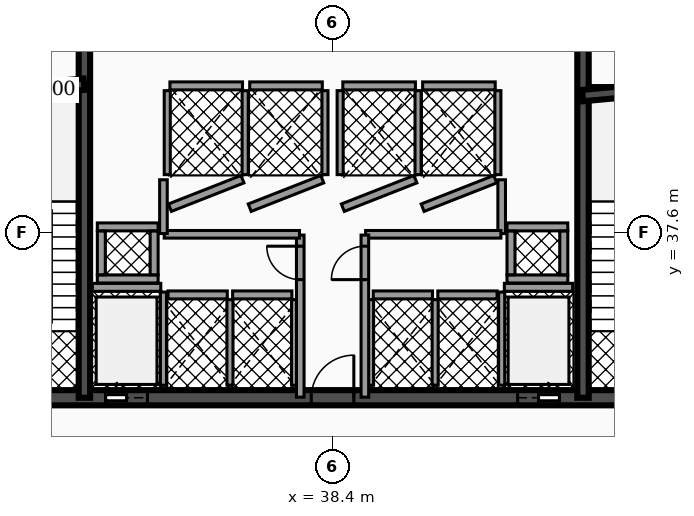
"""IFC4 building model, lengths in metres.
Left out: names, types, materials, properties, quantities, classifications, styles, units other than length and angle.
Written with IfcOpenShell. Run it as: python <this file> out.ifc"""

import sys

from ifc_helpers import new_model, si_unit, direction, frame, frame_2d, origin, place, context, subcontext, project, spatial, rectangle, extrude, element, fill, save


model = new_model("IFC4")
c1 = context("Model", 3, precision=1e-05, world=origin(), true_north=direction((0.0, 1.0)))
c2 = subcontext(c1, "Body", "Model", "MODEL_VIEW")
j1 = project(units=[si_unit("LENGTHUNIT", "METRE"), si_unit("PLANEANGLEUNIT", "RADIAN")], contexts=[c1])
p1 = place(None, origin())
s1 = spatial("IfcSite", under=j1, at=p1, CompositionType="ELEMENT")
p2 = place(p1, origin())
s2 = spatial("IfcBuilding", under=s1, at=p2, CompositionType="ELEMENT")
p3 = place(p2, frame((0.0, 0.0, 9.52)))
s3 = spatial("IfcBuildingStorey", under=s2, at=p3, CompositionType="ELEMENT", Elevation=9.52)
p4 = place(p3, frame((28.4, 33.25, 0.0), z_axis=(0.0, 0.0, 1.0), x_axis=(1.0, 0.0, 0.0)))
e1 = element("IfcWall", 1, at=p4, inside=s3, PredefinedType="SHEAR", context=c2, shape_type="SweptSolid", body=[
    extrude(rectangle(XDim=20.06, YDim=0.4, at=frame_2d((10.03, 0.0))), origin(), (0.0, 0.0, 1.0), 4.14),
])
p5 = place(p4, frame((4.03, 0.0, 0.0)))
e2 = element("IfcOpeningElement", 2, at=p5, cuts=e1, PredefinedType="OPENING", context=c2, shape_type="SweptSolid", body=[
    extrude(rectangle(XDim=1.1, YDim=2.15, at=frame_2d((0.55, 1.075))), frame((0.0, 0.21, 0.0), z_axis=(0.0, -1.0, 0.0), x_axis=(1.0, 0.0, 0.0)), (0.0, 0.0, 1.0), 0.42),
])
p6 = place(p4, frame((14.87, 0.0, 0.0)))
e3 = element("IfcOpeningElement", 3, at=p6, cuts=e1, PredefinedType="OPENING", context=c2, shape_type="SweptSolid", body=[
    extrude(rectangle(XDim=1.1, YDim=2.15, at=frame_2d((0.55, 1.075))), frame((0.0, 0.21, 0.0), z_axis=(0.0, -1.0, 0.0), x_axis=(1.0, 0.0, 0.0)), (0.0, 0.0, 1.0), 0.42),
])
p7 = place(p4, frame((1.31, 0.0, 0.0)))
e4 = element("IfcOpeningElement", 4, at=p7, cuts=e1, PredefinedType="OPENING", context=c2, shape_type="SweptSolid", body=[
    extrude(rectangle(XDim=1.1, YDim=2.2, at=frame_2d((0.55, 1.1))), frame((0.0, 0.21, 0.0), z_axis=(0.0, -1.0, 0.0), x_axis=(1.0, 0.0, 0.0)), (0.0, 0.0, 1.0), 0.42),
])
p8 = place(p4, frame((9.44, 0.0, 0.0)))
e5 = element("IfcOpeningElement", 5, at=p8, cuts=e1, PredefinedType="OPENING", context=c2, shape_type="SweptSolid", body=[
    extrude(rectangle(XDim=1.12, YDim=2.05, at=frame_2d((0.56, 1.025))), frame((0.0, 0.21, 0.0), z_axis=(0.0, -1.0, 0.0), x_axis=(1.0, 0.0, 0.0)), (0.0, 0.0, 1.0), 0.42),
])
p9 = place(p4, frame((17.65, 0.0, 0.0)))
e6 = element("IfcOpeningElement", 6, at=p9, cuts=e1, PredefinedType="OPENING", context=c2, shape_type="SweptSolid", body=[
    extrude(rectangle(XDim=1.1, YDim=2.2, at=frame_2d((0.55, 1.1))), frame((0.0, 0.21, 0.0), z_axis=(0.0, -1.0, 0.0), x_axis=(1.0, 0.0, 0.0)), (0.0, 0.0, 1.0), 0.42),
])
for number, where, z_axis, x_axis in (
    (7, (31.87, 33.25, 0.0), (0.0, 0.0, 1.0), (0.0, 1.0, 0.0)),
    (8, (44.99, 33.25, 0.0), (0.0, 0.0, 1.0), (0.0, 1.0, 0.0)),
):
    element("IfcWall", number, at=place(p3, frame(where, z_axis=z_axis, x_axis=x_axis)), inside=s3, PredefinedType="SHEAR", context=c2, shape_type="SweptSolid", body=[
        extrude(rectangle(XDim=10.2, YDim=0.3, at=frame_2d((5.1, 0.0))), origin(), (0.0, 0.0, 1.0), 4.14),
    ])
p10 = place(p3, frame((28.64, 41.2, 0.0), z_axis=(0.0, 0.0, 1.0), x_axis=(0.995687118776, 0.092774789157, 0.0)))
e9 = element("IfcWall", 9, at=p10, inside=s3, PredefinedType="SHEAR", context=c2, shape_type="SweptSolid", body=[
    extrude(rectangle(XDim=3.234, YDim=0.3, at=frame_2d((1.617, 0.0))), origin(), (0.0, 0.0, 1.0), 4.14),
])
p11 = place(p3, frame((44.98, 41.2, 0.0), z_axis=(0.0, 0.0, 1.0), x_axis=(0.995686468965, 0.09278176286, 0.0)))
e10 = element("IfcWall", 10, at=p11, inside=s3, PredefinedType="SHEAR", context=c2, shape_type="SweptSolid", body=[
    extrude(rectangle(XDim=3.234, YDim=0.3, at=frame_2d((1.617, 0.0))), origin(), (0.0, 0.0, 1.0), 4.14),
])
p12 = place(p3, frame((32.08, 36.155, 0.0), z_axis=(0.0, 0.0, 1.0), x_axis=(1.0, 0.0, 0.0)))
e11 = element("IfcWall", 11, at=p12, inside=s3, PredefinedType="SOLIDWALL", context=c2, shape_type="SweptSolid", body=[
    extrude(rectangle(XDim=1.8, YDim=0.21, at=frame_2d((0.9, 0.0))), origin(), (0.0, 0.0, 1.0), 3.112),
])
p13 = place(p3, frame((33.95, 33.58, 0.0), z_axis=(0.0, 0.0, 1.0), x_axis=(0.0, 1.0, 0.0)))
e12 = element("IfcWall", 12, at=p13, inside=s3, PredefinedType="SOLIDWALL", context=c2, shape_type="SweptSolid", body=[
    extrude(rectangle(XDim=2.45, YDim=0.16, at=frame_2d((1.225, 0.0))), origin(), (0.0, 0.0, 1.0), 3.112),
])
p14 = place(p3, frame((42.92, 36.155, 0.0), z_axis=(0.0, 0.0, 1.0), x_axis=(1.0, 0.0, 0.0)))
e13 = element("IfcWall", 13, at=p14, inside=s3, PredefinedType="SOLIDWALL", context=c2, shape_type="SweptSolid", body=[
    extrude(rectangle(XDim=1.8, YDim=0.21, at=frame_2d((0.9, 0.0))), origin(), (0.0, 0.0, 1.0), 3.112),
])
p15 = place(p3, frame((42.85, 33.58, 0.0), z_axis=(0.0, 0.0, 1.0), x_axis=(0.0, 1.0, 0.0)))
e14 = element("IfcWall", 14, at=p15, inside=s3, PredefinedType="SOLIDWALL", context=c2, shape_type="SweptSolid", body=[
    extrude(rectangle(XDim=2.45, YDim=0.16, at=frame_2d((1.225, 0.0))), origin(), (0.0, 0.0, 1.0), 3.112),
])
p16 = place(p3, frame((34.12, 38.25, 0.0), z_axis=(0.0, 0.0, 1.0), x_axis=(0.930804993012, 0.36551616241, 0.0)))
e15 = element("IfcWall", 15, at=p16, inside=s3, PredefinedType="SOLIDWALL", context=c2, shape_type="SweptSolid", body=[
    extrude(rectangle(XDim=2.052, YDim=0.21, at=frame_2d((1.026, 0.0))), origin(), (0.0, 0.0, 1.0), 3.112),
])
p17 = place(p3, frame((34.12, 41.455, 0.0), z_axis=(0.0, 0.0, 1.0), x_axis=(1.0, 0.0, 0.0)))
e16 = element("IfcWall", 16, at=p17, inside=s3, PredefinedType="SOLIDWALL", context=c2, shape_type="SweptSolid", body=[
    extrude(rectangle(XDim=1.91, YDim=0.21, at=frame_2d((0.955, 0.0))), origin(), (0.0, 0.0, 1.0), 3.112),
])
for number, where, z_axis, x_axis in (
    (17, (34.05, 39.12, 0.0), (0.0, 0.0, 1.0), (0.0, 1.0, 0.0)),
    (18, (36.1, 39.12, 0.0), (0.0, 0.0, 1.0), (0.0, 1.0, 0.0)),
):
    element("IfcWall", number, at=place(p3, frame(where, z_axis=z_axis, x_axis=x_axis)), inside=s3, PredefinedType="SOLIDWALL", context=c2, shape_type="SweptSolid", body=[
        extrude(rectangle(XDim=2.21, YDim=0.16, at=frame_2d((1.105, 0.0))), origin(), (0.0, 0.0, 1.0), 3.112),
    ])
p18 = place(p3, frame((36.22, 38.25, 0.0), z_axis=(0.0, 0.0, 1.0), x_axis=(0.930804993012, 0.36551616241, 0.0)))
e19 = element("IfcWall", 19, at=p18, inside=s3, PredefinedType="SOLIDWALL", context=c2, shape_type="SweptSolid", body=[
    extrude(rectangle(XDim=2.052, YDim=0.21, at=frame_2d((1.026, 0.0))), origin(), (0.0, 0.0, 1.0), 3.112),
])
p19 = place(p3, frame((36.22, 41.455, 0.0), z_axis=(0.0, 0.0, 1.0), x_axis=(1.0, 0.0, 0.0)))
e20 = element("IfcWall", 20, at=p19, inside=s3, PredefinedType="SOLIDWALL", context=c2, shape_type="SweptSolid", body=[
    extrude(rectangle(XDim=1.91, YDim=0.21, at=frame_2d((0.955, 0.0))), origin(), (0.0, 0.0, 1.0), 3.112),
])
p20 = place(p3, frame((38.2, 39.12, 0.0), z_axis=(0.0, 0.0, 1.0), x_axis=(0.0, 1.0, 0.0)))
e21 = element("IfcWall", 21, at=p20, inside=s3, PredefinedType="SOLIDWALL", context=c2, shape_type="SweptSolid", body=[
    extrude(rectangle(XDim=2.21, YDim=0.16, at=frame_2d((1.105, 0.0))), origin(), (0.0, 0.0, 1.0), 3.112),
])
p21 = place(p3, frame((38.67, 38.25, 0.0), z_axis=(0.0, 0.0, 1.0), x_axis=(0.930820886763, 0.3654756856, 0.0)))
e22 = element("IfcWall", 22, at=p21, inside=s3, PredefinedType="SOLIDWALL", context=c2, shape_type="SweptSolid", body=[
    extrude(rectangle(XDim=2.052, YDim=0.21, at=frame_2d((1.026, 0.0))), origin(), (0.0, 0.0, 1.0), 3.112),
])
p22 = place(p3, frame((38.67, 41.455, 0.0), z_axis=(0.0, 0.0, 1.0), x_axis=(1.0, 0.0, 0.0)))
e23 = element("IfcWall", 23, at=p22, inside=s3, PredefinedType="SOLIDWALL", context=c2, shape_type="SweptSolid", body=[
    extrude(rectangle(XDim=1.91, YDim=0.21, at=frame_2d((0.955, 0.0))), origin(), (0.0, 0.0, 1.0), 3.112),
])
for number, where, z_axis, x_axis in (
    (24, (38.6, 39.12, 0.0), (0.0, 0.0, 1.0), (0.0, 1.0, 0.0)),
    (25, (40.65, 39.12, 0.0), (0.0, 0.0, 1.0), (0.0, 1.0, 0.0)),
):
    element("IfcWall", number, at=place(p3, frame(where, z_axis=z_axis, x_axis=x_axis)), inside=s3, PredefinedType="SOLIDWALL", context=c2, shape_type="SweptSolid", body=[
        extrude(rectangle(XDim=2.21, YDim=0.16, at=frame_2d((1.105, 0.0))), origin(), (0.0, 0.0, 1.0), 3.112),
    ])
p23 = place(p3, frame((40.77, 38.25, 0.0), z_axis=(0.0, 0.0, 1.0), x_axis=(0.930804993012, 0.36551616241, 0.0)))
e26 = element("IfcWall", 26, at=p23, inside=s3, PredefinedType="SOLIDWALL", context=c2, shape_type="SweptSolid", body=[
    extrude(rectangle(XDim=2.052, YDim=0.21, at=frame_2d((1.026, 0.0))), origin(), (0.0, 0.0, 1.0), 3.112),
])
p24 = place(p3, frame((40.77, 41.455, 0.0), z_axis=(0.0, 0.0, 1.0), x_axis=(1.0, 0.0, 0.0)))
e27 = element("IfcWall", 27, at=p24, inside=s3, PredefinedType="SOLIDWALL", context=c2, shape_type="SweptSolid", body=[
    extrude(rectangle(XDim=1.91, YDim=0.21, at=frame_2d((0.955, 0.0))), origin(), (0.0, 0.0, 1.0), 3.112),
])
p25 = place(p3, frame((42.75, 39.12, 0.0), z_axis=(0.0, 0.0, 1.0), x_axis=(0.0, 1.0, 0.0)))
e28 = element("IfcWall", 28, at=p25, inside=s3, PredefinedType="SOLIDWALL", context=c2, shape_type="SweptSolid", body=[
    extrude(rectangle(XDim=2.21, YDim=0.16, at=frame_2d((1.105, 0.0))), origin(), (0.0, 0.0, 1.0), 3.112),
])
p26 = place(p3, frame((34.07, 35.955, 0.0), z_axis=(0.0, 0.0, 1.0), x_axis=(1.0, 0.0, 0.0)))
e29 = element("IfcWall", 29, at=p26, inside=s3, PredefinedType="SOLIDWALL", context=c2, shape_type="SweptSolid", body=[
    extrude(rectangle(XDim=1.56, YDim=0.21, at=frame_2d((0.78, 0.0))), origin(), (0.0, 0.0, 1.0), 3.112),
])
p27 = place(p3, frame((35.7, 33.58, 0.0), z_axis=(0.0, 0.0, 1.0), x_axis=(0.0, 1.0, 0.0)))
e30 = element("IfcWall", 30, at=p27, inside=s3, PredefinedType="SOLIDWALL", context=c2, shape_type="SweptSolid", body=[
    extrude(rectangle(XDim=2.25, YDim=0.16, at=frame_2d((1.125, 0.0))), origin(), (0.0, 0.0, 1.0), 3.112),
])
p28 = place(p3, frame((35.77, 35.955, 0.0), z_axis=(0.0, 0.0, 1.0), x_axis=(1.0, 0.0, 0.0)))
e31 = element("IfcWall", 31, at=p28, inside=s3, PredefinedType="SOLIDWALL", context=c2, shape_type="SweptSolid", body=[
    extrude(rectangle(XDim=1.56, YDim=0.21, at=frame_2d((0.78, 0.0))), origin(), (0.0, 0.0, 1.0), 3.112),
])
p29 = place(p3, frame((37.4, 33.58, 0.0), z_axis=(0.0, 0.0, 1.0), x_axis=(0.0, 1.0, 0.0)))
e32 = element("IfcWall", 32, at=p29, inside=s3, PredefinedType="SOLIDWALL", context=c2, shape_type="SweptSolid", body=[
    extrude(rectangle(XDim=2.25, YDim=0.16, at=frame_2d((1.125, 0.0))), origin(), (0.0, 0.0, 1.0), 3.112),
])
p30 = place(p3, frame((39.47, 35.955, 0.0), z_axis=(0.0, 0.0, 1.0), x_axis=(1.0, 0.0, 0.0)))
e33 = element("IfcWall", 33, at=p30, inside=s3, PredefinedType="SOLIDWALL", context=c2, shape_type="SweptSolid", body=[
    extrude(rectangle(XDim=1.56, YDim=0.21, at=frame_2d((0.78, 0.0))), origin(), (0.0, 0.0, 1.0), 3.112),
])
for number, where, z_axis, x_axis in (
    (34, (39.4, 33.58, 0.0), (0.0, 0.0, 1.0), (0.0, 1.0, 0.0)),
    (35, (41.1, 33.58, 0.0), (0.0, 0.0, 1.0), (0.0, 1.0, 0.0)),
):
    element("IfcWall", number, at=place(p3, frame(where, z_axis=z_axis, x_axis=x_axis)), inside=s3, PredefinedType="SOLIDWALL", context=c2, shape_type="SweptSolid", body=[
        extrude(rectangle(XDim=2.25, YDim=0.16, at=frame_2d((1.125, 0.0))), origin(), (0.0, 0.0, 1.0), 3.112),
    ])
p31 = place(p3, frame((41.17, 35.955, 0.0), z_axis=(0.0, 0.0, 1.0), x_axis=(1.0, 0.0, 0.0)))
e36 = element("IfcWall", 36, at=p31, inside=s3, PredefinedType="SOLIDWALL", context=c2, shape_type="SweptSolid", body=[
    extrude(rectangle(XDim=1.56, YDim=0.21, at=frame_2d((0.78, 0.0))), origin(), (0.0, 0.0, 1.0), 3.112),
])
for number, where, z_axis, x_axis in (
    (37, (32.21, 36.375, 0.0), (0.0, 0.0, 1.0), (1.0, 0.0, 0.0)),
    (38, (32.21, 37.745, 0.0), (0.0, 0.0, 1.0), (1.0, 0.0, 0.0)),
):
    element("IfcWall", number, at=place(p3, frame(where, z_axis=z_axis, x_axis=x_axis)), inside=s3, PredefinedType="SOLIDWALL", context=c2, shape_type="SweptSolid", body=[
        extrude(rectangle(XDim=1.6, YDim=0.21, at=frame_2d((0.8, 0.0))), origin(), (0.0, 0.0, 1.0), 4.14),
    ])
for number, where, z_axis, x_axis in (
    (39, (32.315, 36.485, 0.0), (0.0, 0.0, 1.0), (0.0, 1.0, 0.0)),
    (40, (33.705, 36.485, 0.0), (0.0, 0.0, 1.0), (0.0, 1.0, 0.0)),
):
    element("IfcWall", number, at=place(p3, frame(where, z_axis=z_axis, x_axis=x_axis)), inside=s3, PredefinedType="SOLIDWALL", context=c2, shape_type="SweptSolid", body=[
        extrude(rectangle(XDim=1.15, YDim=0.21, at=frame_2d((0.575, 0.0))), origin(), (0.0, 0.0, 1.0), 4.14),
    ])
for number, where, z_axis, x_axis in (
    (41, (42.99, 36.375, 0.0), (0.0, 0.0, 1.0), (1.0, 0.0, 0.0)),
    (42, (42.99, 37.745, 0.0), (0.0, 0.0, 1.0), (1.0, 0.0, 0.0)),
):
    element("IfcWall", number, at=place(p3, frame(where, z_axis=z_axis, x_axis=x_axis)), inside=s3, PredefinedType="SOLIDWALL", context=c2, shape_type="SweptSolid", body=[
        extrude(rectangle(XDim=1.6, YDim=0.21, at=frame_2d((0.8, 0.0))), origin(), (0.0, 0.0, 1.0), 4.14),
    ])
for number, where, z_axis, x_axis in (
    (43, (43.095, 36.485, 0.0), (0.0, 0.0, 1.0), (0.0, 1.0, 0.0)),
    (44, (44.485, 36.485, 0.0), (0.0, 0.0, 1.0), (0.0, 1.0, 0.0)),
):
    element("IfcWall", number, at=place(p3, frame(where, z_axis=z_axis, x_axis=x_axis)), inside=s3, PredefinedType="SOLIDWALL", context=c2, shape_type="SweptSolid", body=[
        extrude(rectangle(XDim=1.15, YDim=0.21, at=frame_2d((0.575, 0.0))), origin(), (0.0, 0.0, 1.0), 4.14),
    ])
p32 = place(p3, frame((37.55, 33.265, 0.0), z_axis=(0.0, 0.0, 1.0), x_axis=(0.0, 1.0, 0.0)))
e45 = element("IfcWall", 45, at=p32, inside=s3, PredefinedType="PARTITIONING", context=c2, shape_type="SweptSolid", body=[
    extrude(rectangle(XDim=4.265, YDim=0.2, at=frame_2d((2.133, 0.0))), origin(), (0.0, 0.0, 1.0), 3.097),
])
p33 = place(p32, frame((3.093, 0.0, 0.0)))
e46 = element("IfcOpeningElement", 46, at=p33, cuts=e45, PredefinedType="OPENING", context=c2, shape_type="SweptSolid", body=[
    extrude(rectangle(XDim=0.88, YDim=2.05, at=frame_2d((0.44, 1.025))), frame((0.0, 0.11, 0.0), z_axis=(0.0, -1.0, 0.0), x_axis=(1.0, 0.0, 0.0)), (0.0, 0.0, 1.0), 0.22),
])
p34 = place(p3, frame((33.97, 37.55, 0.0), z_axis=(0.0, 0.0, 1.0), x_axis=(1.0, 0.0, 0.0)))
e47 = element("IfcWall", 47, at=p34, inside=s3, PredefinedType="PARTITIONING", context=c2, shape_type="SweptSolid", body=[
    extrude(rectangle(XDim=3.56, YDim=0.2, at=frame_2d((1.78, 0.0))), origin(), (0.0, 0.0, 1.0), 3.097),
])
for number, where, z_axis, x_axis in (
    (48, (33.95, 37.57, 0.0), (0.0, 0.0, 1.0), (0.0, 1.0, 0.0)),
    (49, (42.85, 37.57, 0.0), (0.0, 0.0, 1.0), (0.0, 1.0, 0.0)),
):
    element("IfcWall", number, at=place(p3, frame(where, z_axis=z_axis, x_axis=x_axis)), inside=s3, PredefinedType="PARTITIONING", context=c2, shape_type="SweptSolid", body=[
        extrude(rectangle(XDim=1.415, YDim=0.2, at=frame_2d((0.708, 0.0))), origin(), (0.0, 0.0, 1.0), 3.097),
    ])
p35 = place(p3, frame((39.27, 37.55, 0.0), z_axis=(0.0, 0.0, 1.0), x_axis=(1.0, 0.0, 0.0)))
e50 = element("IfcWall", 50, at=p35, inside=s3, PredefinedType="PARTITIONING", context=c2, shape_type="SweptSolid", body=[
    extrude(rectangle(XDim=3.56, YDim=0.2, at=frame_2d((1.78, 0.0))), origin(), (0.0, 0.0, 1.0), 3.097),
])
p36 = place(p3, frame((39.25, 33.265, 0.0), z_axis=(0.0, 0.0, 1.0), x_axis=(0.0, 1.0, 0.0)))
e51 = element("IfcWall", 51, at=p36, inside=s3, PredefinedType="PARTITIONING", context=c2, shape_type="SweptSolid", body=[
    extrude(rectangle(XDim=4.265, YDim=0.2, at=frame_2d((2.133, 0.0))), origin(), (0.0, 0.0, 1.0), 3.097),
])
p37 = place(p36, frame((3.093, 0.0, 0.0)))
e52 = element("IfcOpeningElement", 52, at=p37, cuts=e51, PredefinedType="OPENING", context=c2, shape_type="SweptSolid", body=[
    extrude(rectangle(XDim=0.88, YDim=2.05, at=frame_2d((0.44, 1.025))), frame((0.0, 0.11, 0.0), z_axis=(0.0, -1.0, 0.0), x_axis=(1.0, 0.0, 0.0)), (0.0, 0.0, 1.0), 0.22),
])
p38 = place(p5, origin())
e53 = element("IfcDoor", 53, at=p38, inside=s3, OperationType="SLIDING_TO_LEFT", PredefinedType="DOOR", context=c2, shape_type="SweptSolid", body=[
    extrude(rectangle(XDim=1.1, YDim=2.15, at=frame_2d((0.55, 1.075))), frame((0.0, 0.025, 0.0), z_axis=(0.0, -1.0, 0.0), x_axis=(1.0, 0.0, 0.0)), (0.0, 0.0, 1.0), 0.05),
])
fill(e2, e53)
p39 = place(p6, origin())
e54 = element("IfcDoor", 54, at=p39, inside=s3, OperationType="SLIDING_TO_RIGHT", PredefinedType="DOOR", context=c2, shape_type="SweptSolid", body=[
    extrude(rectangle(XDim=1.1, YDim=2.15, at=frame_2d((0.55, 1.075))), frame((0.0, 0.025, 0.0), z_axis=(0.0, -1.0, 0.0), x_axis=(1.0, 0.0, 0.0)), (0.0, 0.0, 1.0), 0.05),
])
fill(e3, e54)
p40 = place(p8, origin())
e55 = element("IfcDoor", 55, at=p40, inside=s3, OperationType="SINGLE_SWING_RIGHT", PredefinedType="DOOR", context=c2, shape_type="SweptSolid", body=[
    extrude(rectangle(XDim=1.12, YDim=2.05, at=frame_2d((0.56, 1.025))), frame((0.0, 0.025, 0.0), z_axis=(0.0, -1.0, 0.0), x_axis=(1.0, 0.0, 0.0)), (0.0, 0.0, 1.0), 0.05),
])
fill(e5, e55)
p41 = place(p33, origin())
e56 = element("IfcDoor", 56, at=p41, inside=s3, OperationType="SINGLE_SWING_RIGHT", PredefinedType="DOOR", context=c2, shape_type="SweptSolid", body=[
    extrude(rectangle(XDim=0.88, YDim=2.05, at=frame_2d((0.44, 1.025))), frame((0.0, 0.025, 0.0), z_axis=(0.0, -1.0, 0.0), x_axis=(1.0, 0.0, 0.0)), (0.0, 0.0, 1.0), 0.05),
])
fill(e46, e56)
p42 = place(p37, origin())
e57 = element("IfcDoor", 57, at=p42, inside=s3, OperationType="SINGLE_SWING_LEFT", PredefinedType="DOOR", context=c2, shape_type="SweptSolid", body=[
    extrude(rectangle(XDim=0.88, YDim=2.05, at=frame_2d((0.44, 1.025))), frame((0.0, 0.025, 0.0), z_axis=(0.0, -1.0, 0.0), x_axis=(1.0, 0.0, 0.0)), (0.0, 0.0, 1.0), 0.05),
])
fill(e52, e57)
save(model, sys.argv[1])
